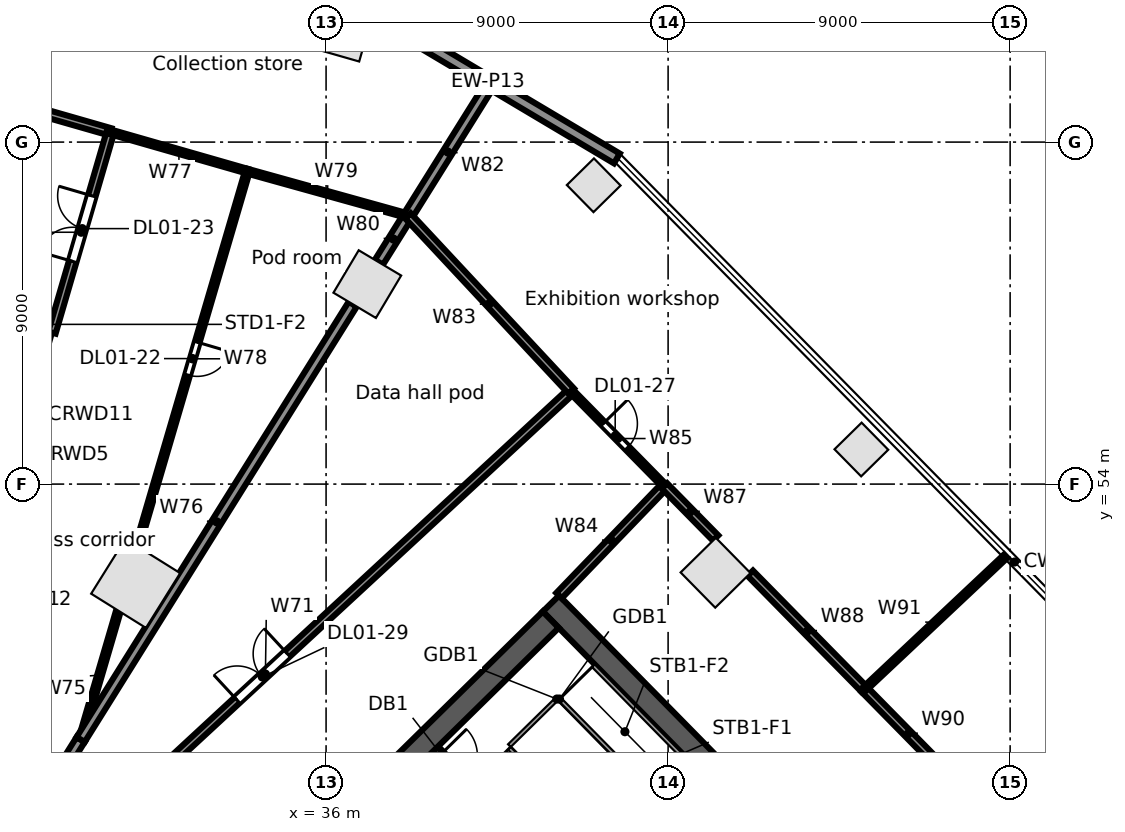
"""IFC4 building model, lengths in metres.
Left out: names, types, materials, properties, quantities, classifications, styles, units other than length and angle.
Written with IfcOpenShell. Run it as: python <this file> out.ifc"""

import sys

from ifc_helpers import new_model, si_unit, direction, frame, frame_2d, origin, origin_2d, place, context, subcontext, project, spatial, rectangle, extrude, element, fill, save


model = new_model("IFC4")
c1 = context("Model", 3, precision=1e-05, world=origin(), true_north=direction((0.0, 1.0)))
c2 = subcontext(c1, "Body", "Model", "MODEL_VIEW")
j1 = project(units=[si_unit("LENGTHUNIT", "METRE"), si_unit("PLANEANGLEUNIT", "RADIAN")], contexts=[c1])
p1 = place(None, origin())
s1 = spatial("IfcSite", under=j1, at=p1, CompositionType="ELEMENT")
p2 = place(p1, origin())
s2 = spatial("IfcBuilding", under=s1, at=p2, CompositionType="ELEMENT")
p3 = place(p2, frame((0.0, 0.0, 6.5)))
s3 = spatial("IfcBuildingStorey", under=s2, at=p3, CompositionType="ELEMENT", Elevation=6.5)
for number, where, z_axis, x_axis in (
    (1, (37.085, 59.262, 0.0), (0.0, 0.0, 1.0), (-0.859, 0.511, 0.0)),
    (2, (46.248, 51.667, 0.0), (0.0, 0.0, 1.0), (-0.701, 0.713, 0.0)),
):
    element("IfcColumn", number, at=place(p3, frame(where, z_axis=z_axis, x_axis=x_axis)), inside=s3, PredefinedType="COLUMN", context=c2, shape_type="SweptSolid", body=[
        extrude(rectangle(XDim=1.3, YDim=1.3, at=origin_2d()), origin(), (0.0, 0.0, 1.0), 5.0),
    ])
p4 = place(p3, frame((30.99, 51.386, 0.0), z_axis=(0.0, 0.0, 1.0), x_axis=(0.529919264233, 0.848048096156, 0.0)))
e3 = element("IfcColumn", 3, at=p4, inside=s3, PredefinedType="COLUMN", context=c2, shape_type="SweptSolid", body=[
    extrude(rectangle(XDim=1.7, YDim=1.7, at=origin_2d()), origin(), (0.0, 0.0, 1.0), 5.0),
])
for number, where, z_axis, x_axis in (
    (4, (36.528, 65.739, 0.0), (0.0, 0.0, 1.0), (-0.961, 0.276, 0.0)),
    (5, (50.086, 54.91, 0.0), (0.0, 0.0, 1.0), (-0.701, 0.713, 0.0)),
    (6, (43.042, 61.863, 0.0), (0.0, 0.0, 1.0), (-0.701, 0.713, 0.0)),
):
    element("IfcColumn", number, at=place(p3, frame(where, z_axis=z_axis, x_axis=x_axis)), inside=s3, PredefinedType="COLUMN", context=c2, shape_type="SweptSolid", body=[
        extrude(rectangle(XDim=1.0, YDim=1.0, at=origin_2d()), origin(), (0.0, 0.0, 1.0), 5.0),
    ])
p5 = place(p3, frame((36.858, 66.612, 0.0), z_axis=(0.0, 0.0, 1.0), x_axis=(0.85940790562, -0.51129057468, 0.0)))
e7 = element("IfcWall", 7, at=p5, inside=s3, PredefinedType="STANDARD", context=c2, shape_type="SweptSolid", body=[
    extrude(rectangle(XDim=7.906, YDim=0.3, at=frame_2d((3.953, 0.0))), origin(), (0.0, 0.0, 1.0), 4.65),
])
p6 = place(p3, frame((38.842, 46.993, 0.0), z_axis=(0.0, 0.0, 1.0), x_axis=(0.700907701701, -0.713251984713, 0.0)))
e8 = element("IfcWall", 8, at=p6, inside=s3, PredefinedType="SOLIDWALL", context=c2, shape_type="SweptSolid", body=[
    extrude(rectangle(XDim=7.1, YDim=0.3, at=frame_2d((3.55, 0.0))), origin(), (0.0, 0.0, 1.0), 4.65),
])
p7 = place(p6, frame((0.2, 0.0, 0.0)))
e9 = element("IfcOpeningElement", 9, at=p7, cuts=e8, PredefinedType="OPENING", context=c2, shape_type="SweptSolid", body=[
    extrude(rectangle(XDim=1.0, YDim=2.1, at=frame_2d((0.5, 1.05))), frame((0.0, 0.16, 0.0), z_axis=(0.0, -1.0, 0.0), x_axis=(1.0, 0.0, 0.0)), (0.0, 0.0, 1.0), 0.32),
])
p8 = place(p3, frame((41.917, 50.856, 0.0), z_axis=(0.0, 0.0, 1.0), x_axis=(0.700911255944, -0.713248491965, 0.0)))
e10 = element("IfcWall", 10, at=p8, inside=s3, PredefinedType="SOLIDWALL", context=c2, shape_type="SweptSolid", body=[
    extrude(rectangle(XDim=15.0, YDim=0.6, at=frame_2d((7.5, 0.0))), origin(), (0.0, 0.0, 1.0), 4.65),
])
p9 = place(p3, frame((32.07, 40.759, 0.0), z_axis=(0.0, 0.0, 1.0), x_axis=(0.713245344712, 0.70091445858, 0.0)))
e11 = element("IfcWall", 11, at=p9, inside=s3, PredefinedType="SOLIDWALL", context=c2, shape_type="SweptSolid", body=[
    extrude(rectangle(XDim=13.8, YDim=0.6, at=frame_2d((6.9, 0.0))), origin(), (0.0, 0.0, 1.0), 4.65),
])
p10 = place(p3, frame((21.674, 65.749, 0.0), z_axis=(0.0, 0.0, 1.0), x_axis=(0.961259417468, -0.275645301662, 0.0)))
e12 = element("IfcWall", 12, at=p10, inside=s3, PredefinedType="PARTITIONING", context=c2, shape_type="SweptSolid", body=[
    extrude(rectangle(XDim=9.0, YDim=0.2, at=frame_2d((4.5, 0.0))), origin(), (0.0, 0.0, 1.0), 3.822),
])
p11 = place(p3, frame((26.356, 41.557, 0.0), z_axis=(0.0, 0.0, 1.0), x_axis=(0.734047402287, 0.679098233834, 0.0)))
e13 = element("IfcWall", 13, at=p11, inside=s3, PredefinedType="PARTITIONING", context=c2, shape_type="SweptSolid", body=[
    extrude(rectangle(XDim=21.926, YDim=0.2, at=frame_2d((10.963, 0.0))), origin(), (0.0, 0.0, 1.0), 3.73),
])
p12 = place(p11, frame((9.95, 0.0, 0.0)))
e14 = element("IfcOpeningElement", 14, at=p12, cuts=e13, PredefinedType="OPENING", context=c2, shape_type="SweptSolid", body=[
    extrude(rectangle(XDim=1.8, YDim=2.1, at=frame_2d((0.9, 1.05))), frame((0.0, 0.11, 0.0), z_axis=(0.0, -1.0, 0.0), x_axis=(1.0, 0.0, 0.0)), (0.0, 0.0, 1.0), 0.22),
])
p13 = place(p3, frame((26.456, 42.338, 0.0), z_axis=(0.0, 0.0, 1.0), x_axis=(0.529836963461, 0.848099517834, 0.0)))
e15 = element("IfcWall", 15, at=p13, inside=s3, PredefinedType="PARTITIONING", context=c2, shape_type="SweptSolid", body=[
    extrude(rectangle(XDim=5.826, YDim=0.25, at=frame_2d((2.913, 0.0))), origin(), (0.0, 0.0, 1.0), 3.712),
])
p14 = place(p3, frame((28.787, 57.987, 0.0), z_axis=(0.0, 0.0, 1.0), x_axis=(0.279752860161, 0.960072047938, 0.0)))
e16 = element("IfcWall", 16, at=p14, inside=s3, PredefinedType="PARTITIONING", context=c2, shape_type="SweptSolid", body=[
    extrude(rectangle(XDim=5.501, YDim=0.2, at=frame_2d((2.75, 0.0))), origin(), (0.0, 0.0, 1.0), 3.922),
])
p15 = place(p14, frame((1.95, 0.0, 0.0)))
e17 = element("IfcOpeningElement", 17, at=p15, cuts=e16, PredefinedType="OPENING", context=c2, shape_type="SweptSolid", body=[
    extrude(rectangle(XDim=1.8, YDim=2.1, at=frame_2d((0.9, 1.05))), frame((0.0, 0.11, 0.0), z_axis=(0.0, -1.0, 0.0), x_axis=(1.0, 0.0, 0.0)), (0.0, 0.0, 1.0), 0.22),
])
p16 = place(p3, frame((29.543, 47.279, 0.0), z_axis=(0.0, 0.0, 1.0), x_axis=(0.28156355079, 0.959542582102, 0.0)))
e18 = element("IfcWall", 18, at=p16, inside=s3, PredefinedType="PARTITIONING", context=c2, shape_type="SweptSolid", body=[
    extrude(rectangle(XDim=3.531, YDim=0.125, at=frame_2d((1.765, 0.0))), origin(), (0.0, 0.0, 1.0), 3.712),
])
p17 = place(p3, frame((29.543, 47.279, 0.0), z_axis=(0.0, 0.0, 1.0), x_axis=(0.529929076845, 0.848041964477, 0.0)))
e19 = element("IfcWall", 19, at=p17, inside=s3, PredefinedType="PARTITIONING", context=c2, shape_type="SweptSolid", body=[
    extrude(rectangle(XDim=13.507, YDim=0.25, at=frame_2d((6.754, 0.0))), origin(), (0.0, 0.0, 1.0), 3.73),
])
p18 = place(p3, frame((30.326, 63.268, 0.0), z_axis=(0.0, 0.0, 1.0), x_axis=(0.96120880595, -0.275821738383, 0.0)))
e20 = element("IfcWall", 20, at=p18, inside=s3, PredefinedType="PARTITIONING", context=c2, shape_type="SweptSolid", body=[
    extrude(rectangle(XDim=3.75, YDim=0.125, at=frame_2d((1.875, 0.0))), origin(), (0.0, 0.0, 1.0), 4.65),
])
p19 = place(p3, frame((31.034, 52.361, 0.0), z_axis=(0.0, 0.0, 1.0), x_axis=(0.281471237406, 0.959569665273, 0.0)))
e21 = element("IfcWall", 21, at=p19, inside=s3, PredefinedType="PARTITIONING", context=c2, shape_type="SweptSolid", body=[
    extrude(rectangle(XDim=10.289, YDim=0.125, at=frame_2d((5.145, 0.0))), origin(), (0.0, 0.0, 1.0), 3.922),
])
p20 = place(p19, frame((4.7, 0.0, 0.0)))
e22 = element("IfcOpeningElement", 22, at=p20, cuts=e21, PredefinedType="OPENING", context=c2, shape_type="SweptSolid", body=[
    extrude(rectangle(XDim=0.9, YDim=2.1, at=frame_2d((0.45, 1.05))), frame((0.0, 0.073, 0.0), z_axis=(0.0, -1.0, 0.0), x_axis=(1.0, 0.0, 0.0)), (0.0, 0.0, 1.0), 0.145),
])
p21 = place(p3, frame((33.93, 62.234, 0.0), z_axis=(0.0, 0.0, 1.0), x_axis=(0.963433299433, -0.267948274007, 0.0)))
e23 = element("IfcWall", 23, at=p21, inside=s3, PredefinedType="PARTITIONING", context=c2, shape_type="SweptSolid", body=[
    extrude(rectangle(XDim=4.385, YDim=0.125, at=frame_2d((2.192, 0.0))), origin(), (0.0, 0.0, 1.0), 4.018),
])
p22 = place(p3, frame((37.39, 59.837, 0.0), z_axis=(0.0, 0.0, 1.0), x_axis=(0.530151180786, 0.84790313451, 0.0)))
e24 = element("IfcWall", 24, at=p22, inside=s3, PredefinedType="PARTITIONING", context=c2, shape_type="SweptSolid", body=[
    extrude(rectangle(XDim=1.441, YDim=0.25, at=frame_2d((0.721, 0.0))), origin(), (0.0, 0.0, 1.0), 4.65),
])
p23 = place(p3, frame((38.154, 61.059, 0.0), z_axis=(0.0, 0.0, 1.0), x_axis=(0.529921368013, 0.848046781565, 0.0)))
e25 = element("IfcWall", 25, at=p23, inside=s3, PredefinedType="PARTITIONING", context=c2, shape_type="SweptSolid", body=[
    extrude(rectangle(XDim=3.961, YDim=0.25, at=frame_2d((1.98, 0.0))), origin(), (0.0, 0.0, 1.0), 4.024),
])
p24 = place(p3, frame((38.154, 61.059, 0.0), z_axis=(0.0, 0.0, 1.0), x_axis=(0.681663875787, -0.731665470312, 0.0)))
e26 = element("IfcWall", 26, at=p24, inside=s3, PredefinedType="PARTITIONING", context=c2, shape_type="SweptSolid", body=[
    extrude(rectangle(XDim=6.303, YDim=0.2, at=frame_2d((3.152, 0.0))), origin(), (0.0, 0.0, 1.0), 4.018),
])
p25 = place(p3, frame((42.13, 51.066, 0.0), z_axis=(0.0, 0.0, 1.0), x_axis=(0.693124563472, 0.720817826855, 0.0)))
e27 = element("IfcWall", 27, at=p25, inside=s3, PredefinedType="PARTITIONING", context=c2, shape_type="SweptSolid", body=[
    extrude(rectangle(XDim=4.002, YDim=0.2, at=frame_2d((2.001, 0.0))), origin(), (0.0, 0.0, 1.0), 3.83),
])
p26 = place(p3, frame((42.451, 56.447, 0.0), z_axis=(0.0, 0.0, 1.0), x_axis=(0.700941316052, -0.713218950569, 0.0)))
e28 = element("IfcWall", 28, at=p26, inside=s3, PredefinedType="PARTITIONING", context=c2, shape_type="SweptSolid", body=[
    extrude(rectangle(XDim=3.5, YDim=0.125, at=frame_2d((1.75, 0.0))), origin(), (0.0, 0.0, 1.0), 4.65),
])
p27 = place(p26, frame((1.2, 0.0, 0.0)))
e29 = element("IfcOpeningElement", 29, at=p27, cuts=e28, PredefinedType="OPENING", context=c2, shape_type="SweptSolid", body=[
    extrude(rectangle(XDim=0.9, YDim=2.1, at=frame_2d((0.45, 1.05))), frame((0.0, 0.073, 0.0), z_axis=(0.0, -1.0, 0.0), x_axis=(1.0, 0.0, 0.0)), (0.0, 0.0, 1.0), 0.145),
])
p28 = place(p3, frame((44.904, 53.951, 0.0), z_axis=(0.0, 0.0, 1.0), x_axis=(0.7008501288, -0.713308556629, 0.0)))
e30 = element("IfcWall", 30, at=p28, inside=s3, PredefinedType="PARTITIONING", context=c2, shape_type="SweptSolid", body=[
    extrude(rectangle(XDim=1.92, YDim=0.2, at=frame_2d((0.96, 0.0))), origin(), (0.0, 0.0, 1.0), 4.65),
])
p29 = place(p3, frame((47.162, 51.654, 0.0), z_axis=(0.0, 0.0, 1.0), x_axis=(0.700745868246, -0.713410981228, 0.0)))
e31 = element("IfcWall", 31, at=p29, inside=s3, PredefinedType="PARTITIONING", context=c2, shape_type="SweptSolid", body=[
    extrude(rectangle(XDim=4.279, YDim=0.2, at=frame_2d((2.14, 0.0))), origin(), (0.0, 0.0, 1.0), 4.65),
])
p30 = place(p3, frame((50.161, 48.601, 0.0), z_axis=(0.0, 0.0, 1.0), x_axis=(0.701000458272, -0.713160821626, 0.0)))
e32 = element("IfcWall", 32, at=p30, inside=s3, PredefinedType="PARTITIONING", context=c2, shape_type="SweptSolid", body=[
    extrude(rectangle(XDim=3.292, YDim=0.2, at=frame_2d((1.646, 0.0))), origin(), (0.0, 0.0, 1.0), 4.65),
])
p31 = place(p3, frame((50.161, 48.601, 0.0), z_axis=(0.0, 0.0, 1.0), x_axis=(0.728418768666, 0.685132175172, 0.0)))
e33 = element("IfcWall", 33, at=p31, inside=s3, PredefinedType="PARTITIONING", context=c2, shape_type="SweptSolid", body=[
    extrude(rectangle(XDim=5.11, YDim=0.125, at=frame_2d((2.555, 0.0))), origin(), (0.0, 0.0, 1.0), 3.93),
])
p32 = place(p20, frame((0.9, 0.0, 0.0), z_axis=(0.0, 0.0, 1.0), x_axis=(-1.0, 0.0, 0.0)))
e34 = element("IfcDoor", 34, at=p32, inside=s3, OperationType="SINGLE_SWING_LEFT", PredefinedType="DOOR", context=c2, shape_type="SweptSolid", body=[
    extrude(rectangle(XDim=0.9, YDim=2.1, at=frame_2d((0.45, 1.05))), frame((0.0, 0.025, 0.0), z_axis=(0.0, -1.0, 0.0), x_axis=(1.0, 0.0, 0.0)), (0.0, 0.0, 1.0), 0.05),
])
fill(e22, e34)
p33 = place(p15, origin())
e35 = element("IfcDoor", 35, at=p33, inside=s3, OperationType="DOUBLE_DOOR_SINGLE_SWING", PredefinedType="DOOR", context=c2, shape_type="SweptSolid", body=[
    extrude(rectangle(XDim=1.8, YDim=2.1, at=frame_2d((0.9, 1.05))), frame((0.0, 0.025, 0.0), z_axis=(0.0, -1.0, 0.0), x_axis=(1.0, 0.0, 0.0)), (0.0, 0.0, 1.0), 0.05),
])
fill(e17, e35)
p34 = place(p27, origin())
e36 = element("IfcDoor", 36, at=p34, inside=s3, OperationType="SINGLE_SWING_LEFT", PredefinedType="DOOR", context=c2, shape_type="SweptSolid", body=[
    extrude(rectangle(XDim=0.9, YDim=2.1, at=frame_2d((0.45, 1.05))), frame((0.0, 0.025, 0.0), z_axis=(0.0, -1.0, 0.0), x_axis=(1.0, 0.0, 0.0)), (0.0, 0.0, 1.0), 0.05),
])
fill(e29, e36)
p35 = place(p12, origin())
e37 = element("IfcDoor", 37, at=p35, inside=s3, OperationType="DOUBLE_DOOR_SINGLE_SWING", PredefinedType="DOOR", context=c2, shape_type="SweptSolid", body=[
    extrude(rectangle(XDim=1.8, YDim=2.1, at=frame_2d((0.9, 1.05))), frame((0.0, 0.025, 0.0), z_axis=(0.0, -1.0, 0.0), x_axis=(1.0, 0.0, 0.0)), (0.0, 0.0, 1.0), 0.05),
])
fill(e14, e37)
save(model, sys.argv[1])
